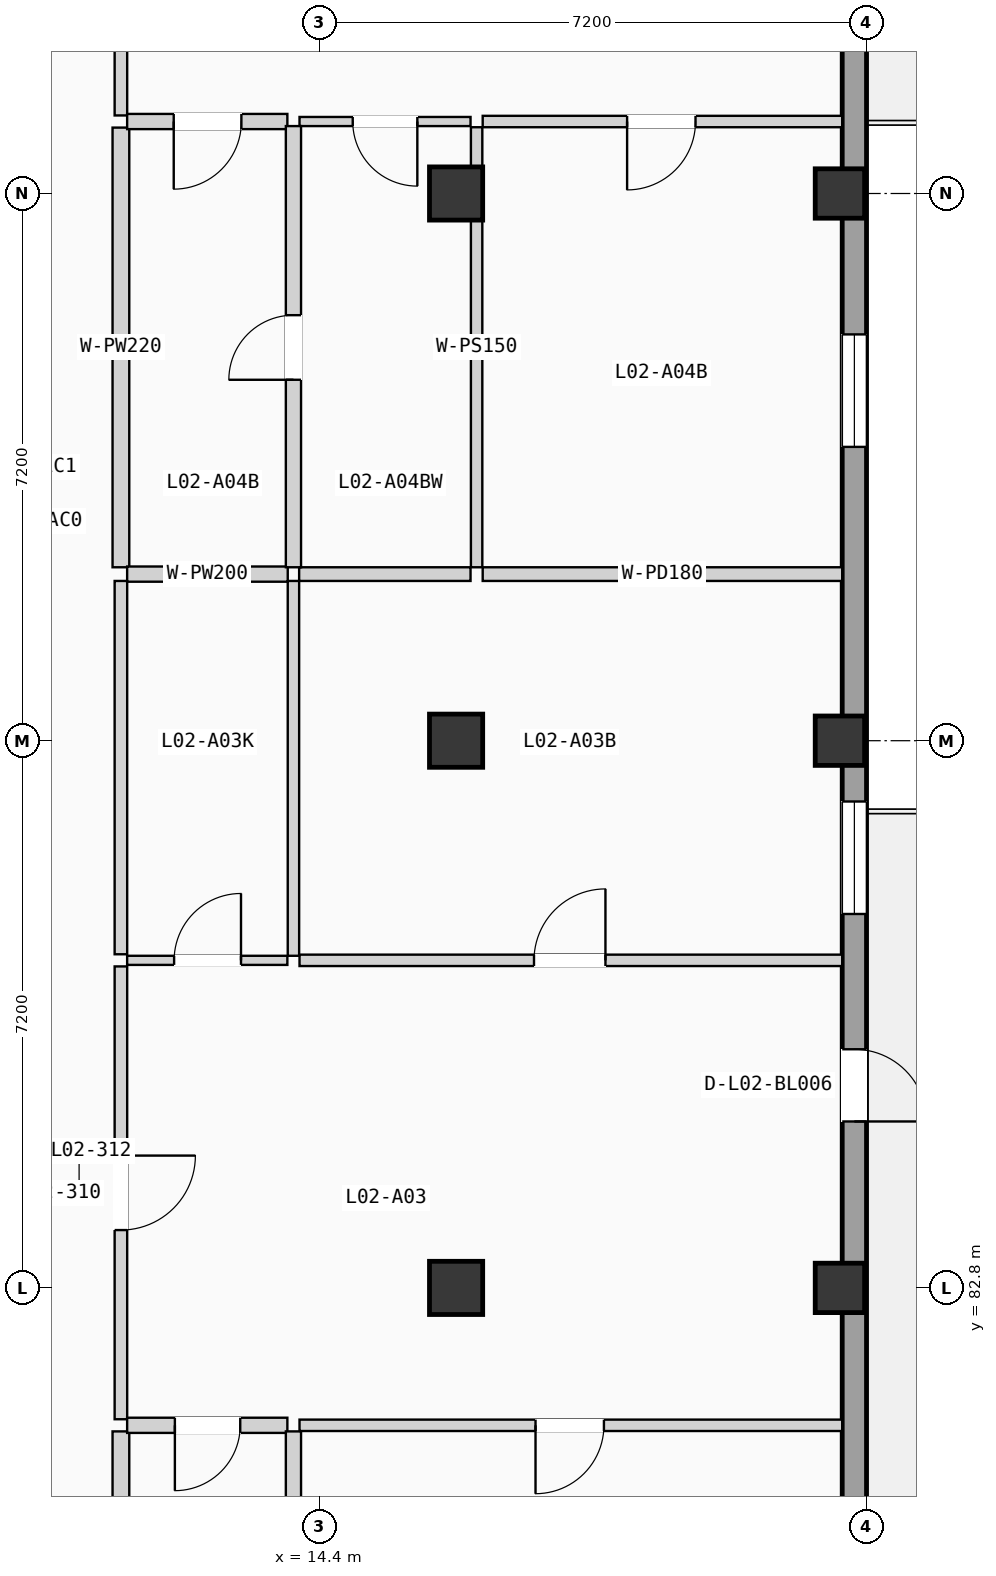
"""IFC4 building model, lengths in metres.
Left out: names, types, materials, properties, quantities, classifications, styles, units other than length and angle.
Written with IfcOpenShell. Run it as: python <this file> out.ifc"""

import sys

from ifc_helpers import new_model, si_unit, direction, frame, frame_2d, origin, origin_2d, place, context, subcontext, project, spatial, rectangle, extrude, element, fill, save


model = new_model("IFC4")
c1 = context("Model", 3, precision=1e-05, world=origin(), true_north=direction((0.0, 1.0)))
c2 = subcontext(c1, "Body", "Model", "MODEL_VIEW")
j1 = project(units=[si_unit("LENGTHUNIT", "METRE"), si_unit("PLANEANGLEUNIT", "RADIAN")], contexts=[c1])
p1 = place(None, origin())
s1 = spatial("IfcSite", under=j1, at=p1, CompositionType="ELEMENT")
p2 = place(p1, origin())
s2 = spatial("IfcBuilding", under=s1, at=p2, CompositionType="ELEMENT")
p3 = place(p2, frame((0.0, 0.0, 8.575)))
s3 = spatial("IfcBuildingStorey", under=s2, at=p3, CompositionType="ELEMENT", Elevation=8.575)
for number, where, z_axis, x_axis in (
    (1, (16.2, 82.8, 0.0), (0.0, 0.0, 1.0), (1.0, 0.0, 0.0)),
    (2, (16.2, 90.0, 0.0), (0.0, 0.0, 1.0), (1.0, 0.0, 0.0)),
    (3, (16.2, 97.2, 0.0), (0.0, 0.0, 1.0), (1.0, 0.0, 0.0)),
):
    element("IfcColumn", number, at=place(p3, frame(where, z_axis=z_axis, x_axis=x_axis)), inside=s3, PredefinedType="COLUMN", context=c2, shape_type="SweptSolid", body=[
        extrude(rectangle(XDim=0.7, YDim=0.7, at=origin_2d()), origin(), (0.0, 0.0, 1.0), 3.5),
    ])
for number, where, z_axis, x_axis in (
    (4, (21.25, 82.8, 0.0), (0.0, 0.0, 1.0), (1.0, 0.0, 0.0)),
    (5, (21.25, 90.0, 0.0), (0.0, 0.0, 1.0), (1.0, 0.0, 0.0)),
    (6, (21.25, 97.2, 0.0), (0.0, 0.0, 1.0), (1.0, 0.0, 0.0)),
):
    element("IfcColumn", number, at=place(p3, frame(where, z_axis=z_axis, x_axis=x_axis)), inside=s3, PredefinedType="COLUMN", context=c2, shape_type="SweptSolid", body=[
        extrude(rectangle(XDim=0.65, YDim=0.65, at=origin_2d()), origin(), (0.0, 0.0, 1.0), 3.5),
    ])
p4 = place(p3, frame((21.44, 68.72, 0.0), z_axis=(0.0, 0.0, 1.0), x_axis=(0.0, 1.0, 0.0)))
e7 = element("IfcWall", 7, at=p4, inside=s3, PredefinedType="SOLIDWALL", context=c2, shape_type="SweptSolid", body=[
    extrude(rectangle(XDim=49.76, YDim=0.32, at=frame_2d((24.88, 0.0))), origin(), (0.0, 0.0, 1.0), 3.24),
])
p5 = place(p4, frame((16.27, 0.0, 0.0)))
e8 = element("IfcOpeningElement", 8, at=p5, cuts=e7, PredefinedType="OPENING", context=c2, shape_type="SweptSolid", body=[
    extrude(rectangle(XDim=0.95, YDim=2.15, at=frame_2d((0.475, 1.075))), frame((0.0, 0.17, 0.0), z_axis=(0.0, -1.0, 0.0), x_axis=(1.0, 0.0, 0.0)), (0.0, 0.0, 1.0), 0.34),
])
p6 = place(p4, frame((8.996, 0.0, 0.9)))
e9 = element("IfcOpeningElement", 9, at=p6, cuts=e7, PredefinedType="OPENING", context=c2, shape_type="SweptSolid", body=[
    extrude(rectangle(XDim=1.48, YDim=1.2, at=frame_2d((0.74, 0.6))), frame((0.0, 0.17, 0.0), z_axis=(0.0, -1.0, 0.0), x_axis=(1.0, 0.0, 0.0)), (0.0, 0.0, 1.0), 0.34),
])
p7 = place(p4, frame((19.0, 0.0, 0.9)))
e10 = element("IfcOpeningElement", 10, at=p7, cuts=e7, PredefinedType="OPENING", context=c2, shape_type="SweptSolid", body=[
    extrude(rectangle(XDim=1.48, YDim=1.35, at=frame_2d((0.74, 0.675))), frame((0.0, 0.17, 0.0), z_axis=(0.0, -1.0, 0.0), x_axis=(1.0, 0.0, 0.0)), (0.0, 0.0, 1.0), 0.34),
])
p8 = place(p4, frame((32.365, 0.0, 0.0)))
e11 = element("IfcOpeningElement", 11, at=p8, cuts=e7, PredefinedType="OPENING", context=c2, shape_type="SweptSolid", body=[
    extrude(rectangle(XDim=1.08, YDim=2.18, at=frame_2d((0.54, 1.09))), frame((0.0, 0.17, 0.0), z_axis=(0.0, -1.0, 0.0), x_axis=(1.0, 0.0, 0.0)), (0.0, 0.0, 1.0), 0.34),
])
p9 = place(p4, frame((25.146, 0.0, 0.9)))
e12 = element("IfcOpeningElement", 12, at=p9, cuts=e7, PredefinedType="OPENING", context=c2, shape_type="SweptSolid", body=[
    extrude(rectangle(XDim=1.48, YDim=1.5, at=frame_2d((0.74, 0.75))), frame((0.0, 0.17, 0.0), z_axis=(0.0, -1.0, 0.0), x_axis=(1.0, 0.0, 0.0)), (0.0, 0.0, 1.0), 0.34),
])
p10 = place(p4, frame((38.848, 0.0, 0.9)))
e13 = element("IfcOpeningElement", 13, at=p10, cuts=e7, PredefinedType="OPENING", context=c2, shape_type="SweptSolid", body=[
    extrude(rectangle(XDim=1.48, YDim=1.65, at=frame_2d((0.74, 0.825))), frame((0.0, 0.17, 0.0), z_axis=(0.0, -1.0, 0.0), x_axis=(1.0, 0.0, 0.0)), (0.0, 0.0, 1.0), 0.34),
])
p11 = place(p3, frame((11.79, 81.072, 0.0), z_axis=(0.0, 0.0, 1.0), x_axis=(0.0, 1.0, 0.0)))
e14 = element("IfcWall", 14, at=p11, inside=s3, PredefinedType="PARTITIONING", context=c2, shape_type="SweptSolid", body=[
    extrude(rectangle(XDim=5.958, YDim=0.165, at=frame_2d((2.979, 0.0))), origin(), (0.0, 0.0, 1.0), 3.22),
])
p12 = place(p11, frame((2.489, 0.0, 0.0)))
e15 = element("IfcOpeningElement", 15, at=p12, cuts=e14, PredefinedType="OPENING", context=c2, shape_type="SweptSolid", body=[
    extrude(rectangle(XDim=0.98, YDim=2.08, at=frame_2d((0.49, 1.04))), frame((0.0, 0.093, 0.0), z_axis=(0.0, -1.0, 0.0), x_axis=(1.0, 0.0, 0.0)), (0.0, 0.0, 1.0), 0.185),
])
p13 = place(p3, frame((11.79, 75.975, 0.0), z_axis=(0.0, 0.0, 1.0), x_axis=(0.0, 1.0, 0.0)))
e16 = element("IfcWall", 16, at=p13, inside=s3, PredefinedType="PLUMBINGWALL", context=c2, shape_type="SweptSolid", body=[
    extrude(rectangle(XDim=4.937, YDim=0.22, at=frame_2d((2.469, 0.0))), origin(), (0.0, 0.0, 1.0), 3.22),
])
p14 = place(p3, frame((11.79, 87.19, 0.0), z_axis=(0.0, 0.0, 1.0), x_axis=(0.0, 1.0, 0.0)))
e17 = element("IfcWall", 17, at=p14, inside=s3, PredefinedType="PARTITIONING", context=c2, shape_type="SweptSolid", body=[
    extrude(rectangle(XDim=4.912, YDim=0.165, at=frame_2d((2.456, 0.0))), origin(), (0.0, 0.0, 1.0), 3.22),
])
p15 = place(p3, frame((11.79, 98.227, 0.0), z_axis=(0.0, 0.0, 1.0), x_axis=(0.0, 1.0, 0.0)))
e18 = element("IfcWall", 18, at=p15, inside=s3, PredefinedType="PARTITIONING", context=c2, shape_type="SweptSolid", body=[
    extrude(rectangle(XDim=7.028, YDim=0.165, at=frame_2d((3.514, 0.0))), origin(), (0.0, 0.0, 1.0), 3.22),
])
p16 = place(p15, frame((3.024, 0.0, 0.0)))
e19 = element("IfcOpeningElement", 19, at=p16, cuts=e18, PredefinedType="OPENING", context=c2, shape_type="SweptSolid", body=[
    extrude(rectangle(XDim=0.98, YDim=2.08, at=frame_2d((0.49, 1.04))), frame((0.0, 0.093, 0.0), z_axis=(0.0, -1.0, 0.0), x_axis=(1.0, 0.0, 0.0)), (0.0, 0.0, 1.0), 0.185),
])
p17 = place(p3, frame((11.79, 92.282, 0.0), z_axis=(0.0, 0.0, 1.0), x_axis=(0.0, 1.0, 0.0)))
e20 = element("IfcWall", 20, at=p17, inside=s3, PredefinedType="PLUMBINGWALL", context=c2, shape_type="SweptSolid", body=[
    extrude(rectangle(XDim=5.785, YDim=0.22, at=frame_2d((2.893, 0.0))), origin(), (0.0, 0.0, 1.0), 3.22),
])
p18 = place(p3, frame((11.872, 80.992, 0.0), z_axis=(0.0, 0.0, 1.0), x_axis=(1.0, 0.0, 0.0)))
e21 = element("IfcWall", 21, at=p18, inside=s3, PredefinedType="PLUMBINGWALL", context=c2, shape_type="SweptSolid", body=[
    extrude(rectangle(XDim=2.108, YDim=0.2, at=frame_2d((1.054, 0.0))), origin(), (0.0, 0.0, 1.0), 3.22),
])
p19 = place(p18, frame((0.628, 0.0, 0.0)))
e22 = element("IfcOpeningElement", 22, at=p19, cuts=e21, PredefinedType="OPENING", context=c2, shape_type="SweptSolid", body=[
    extrude(rectangle(XDim=0.86, YDim=2.0, at=frame_2d((0.43, 1.0))), frame((0.0, 0.11, 0.0), z_axis=(0.0, -1.0, 0.0), x_axis=(1.0, 0.0, 0.0)), (0.0, 0.0, 1.0), 0.22),
])
p20 = place(p3, frame((11.872, 87.11, 0.0), z_axis=(0.0, 0.0, 1.0), x_axis=(1.0, 0.0, 0.0)))
e23 = element("IfcWall", 23, at=p20, inside=s3, PredefinedType="PARTITIONING", context=c2, shape_type="SweptSolid", body=[
    extrude(rectangle(XDim=2.108, YDim=0.12, at=frame_2d((1.054, 0.0))), origin(), (0.0, 0.0, 1.0), 3.22),
])
p21 = place(p20, frame((0.618, 0.0, 0.0)))
e24 = element("IfcOpeningElement", 24, at=p21, cuts=e23, PredefinedType="OPENING", context=c2, shape_type="SweptSolid", body=[
    extrude(rectangle(XDim=0.88, YDim=2.02, at=frame_2d((0.44, 1.01))), frame((0.0, 0.07, 0.0), z_axis=(0.0, -1.0, 0.0), x_axis=(1.0, 0.0, 0.0)), (0.0, 0.0, 1.0), 0.14),
])
p22 = place(p3, frame((14.14, 80.992, 0.0), z_axis=(0.0, 0.0, 1.0), x_axis=(1.0, 0.0, 0.0)))
e25 = element("IfcWall", 25, at=p22, inside=s3, PredefinedType="PARTITIONING", context=c2, shape_type="SweptSolid", body=[
    extrude(rectangle(XDim=7.14, YDim=0.15, at=frame_2d((3.57, 0.0))), origin(), (0.0, 0.0, 1.0), 3.22),
])
p23 = place(p22, frame((3.105, 0.0, 0.0)))
e26 = element("IfcOpeningElement", 26, at=p23, cuts=e25, PredefinedType="OPENING", context=c2, shape_type="SweptSolid", body=[
    extrude(rectangle(XDim=0.9, YDim=2.04, at=frame_2d((0.45, 1.02))), frame((0.0, 0.085, 0.0), z_axis=(0.0, -1.0, 0.0), x_axis=(1.0, 0.0, 0.0)), (0.0, 0.0, 1.0), 0.17),
])
p24 = place(p3, frame((14.14, 87.11, 0.0), z_axis=(0.0, 0.0, 1.0), x_axis=(1.0, 0.0, 0.0)))
e27 = element("IfcWall", 27, at=p24, inside=s3, PredefinedType="PARTITIONING", context=c2, shape_type="SweptSolid", body=[
    extrude(rectangle(XDim=7.14, YDim=0.15, at=frame_2d((3.57, 0.0))), origin(), (0.0, 0.0, 1.0), 3.22),
])
p25 = place(p24, frame((3.085, 0.0, 0.0)))
e28 = element("IfcOpeningElement", 28, at=p25, cuts=e27, PredefinedType="OPENING", context=c2, shape_type="SweptSolid", body=[
    extrude(rectangle(XDim=0.94, YDim=2.06, at=frame_2d((0.47, 1.03))), frame((0.0, 0.085, 0.0), z_axis=(0.0, -1.0, 0.0), x_axis=(1.0, 0.0, 0.0)), (0.0, 0.0, 1.0), 0.17),
])
p26 = place(p3, frame((14.06, 75.975, 0.0), z_axis=(0.0, 0.0, 1.0), x_axis=(0.0, 1.0, 0.0)))
e29 = element("IfcWall", 29, at=p26, inside=s3, PredefinedType="PLUMBINGWALL", context=c2, shape_type="SweptSolid", body=[
    extrude(rectangle(XDim=4.937, YDim=0.2, at=frame_2d((2.469, 0.0))), origin(), (0.0, 0.0, 1.0), 3.22),
])
p27 = place(p3, frame((14.06, 87.17, 0.0), z_axis=(0.0, 0.0, 1.0), x_axis=(0.0, 1.0, 0.0)))
e30 = element("IfcWall", 30, at=p27, inside=s3, PredefinedType="PARTITIONING", context=c2, shape_type="SweptSolid", body=[
    extrude(rectangle(XDim=4.932, YDim=0.15, at=frame_2d((2.466, 0.0))), origin(), (0.0, 0.0, 1.0), 3.22),
])
p28 = place(p3, frame((11.872, 92.192, 0.0), z_axis=(0.0, 0.0, 1.0), x_axis=(1.0, 0.0, 0.0)))
e31 = element("IfcWall", 31, at=p28, inside=s3, PredefinedType="PLUMBINGWALL", context=c2, shape_type="SweptSolid", body=[
    extrude(rectangle(XDim=2.113, YDim=0.2, at=frame_2d((1.057, 0.0))), origin(), (0.0, 0.0, 1.0), 3.22),
])
p29 = place(p3, frame((16.55, 92.192, 0.0), z_axis=(0.0, 0.0, 1.0), x_axis=(1.0, 0.0, 0.0)))
e32 = element("IfcWall", 32, at=p29, inside=s3, PredefinedType="PARTITIONING", context=c2, shape_type="SweptSolid", body=[
    extrude(rectangle(XDim=4.73, YDim=0.18, at=frame_2d((2.365, 0.0))), origin(), (0.0, 0.0, 1.0), 3.22),
])
p30 = place(p3, frame((14.135, 92.192, 0.0), z_axis=(0.0, 0.0, 1.0), x_axis=(1.0, 0.0, 0.0)))
e33 = element("IfcWall", 33, at=p30, inside=s3, PredefinedType="PARTITIONING", context=c2, shape_type="SweptSolid", body=[
    extrude(rectangle(XDim=2.255, YDim=0.18, at=frame_2d((1.127, 0.0))), origin(), (0.0, 0.0, 1.0), 3.22),
])
p31 = place(p3, frame((11.872, 98.147, 0.0), z_axis=(0.0, 0.0, 1.0), x_axis=(1.0, 0.0, 0.0)))
e34 = element("IfcWall", 34, at=p31, inside=s3, PredefinedType="PLUMBINGWALL", context=c2, shape_type="SweptSolid", body=[
    extrude(rectangle(XDim=2.108, YDim=0.2, at=frame_2d((1.054, 0.0))), origin(), (0.0, 0.0, 1.0), 3.22),
])
p32 = place(p31, frame((0.613, 0.0, 0.0)))
e35 = element("IfcOpeningElement", 35, at=p32, cuts=e34, PredefinedType="OPENING", context=c2, shape_type="SweptSolid", body=[
    extrude(rectangle(XDim=0.89, YDim=2.03, at=frame_2d((0.445, 1.015))), frame((0.0, 0.11, 0.0), z_axis=(0.0, -1.0, 0.0), x_axis=(1.0, 0.0, 0.0)), (0.0, 0.0, 1.0), 0.22),
])
p33 = place(p3, frame((16.55, 98.147, 0.0), z_axis=(0.0, 0.0, 1.0), x_axis=(1.0, 0.0, 0.0)))
e36 = element("IfcWall", 36, at=p33, inside=s3, PredefinedType="PARTITIONING", context=c2, shape_type="SweptSolid", body=[
    extrude(rectangle(XDim=4.73, YDim=0.15, at=frame_2d((2.365, 0.0))), origin(), (0.0, 0.0, 1.0), 3.22),
])
p34 = place(p33, frame((1.9, 0.0, 0.0)))
e37 = element("IfcOpeningElement", 37, at=p34, cuts=e36, PredefinedType="OPENING", context=c2, shape_type="SweptSolid", body=[
    extrude(rectangle(XDim=0.9, YDim=2.04, at=frame_2d((0.45, 1.02))), frame((0.0, 0.085, 0.0), z_axis=(0.0, -1.0, 0.0), x_axis=(1.0, 0.0, 0.0)), (0.0, 0.0, 1.0), 0.17),
])
p35 = place(p3, frame((14.14, 98.147, 0.0), z_axis=(0.0, 0.0, 1.0), x_axis=(1.0, 0.0, 0.0)))
e38 = element("IfcWall", 38, at=p35, inside=s3, PredefinedType="PARTITIONING", context=c2, shape_type="SweptSolid", body=[
    extrude(rectangle(XDim=2.25, YDim=0.12, at=frame_2d((1.125, 0.0))), origin(), (0.0, 0.0, 1.0), 3.22),
])
p36 = place(p35, frame((0.7, 0.0, 0.0)))
e39 = element("IfcOpeningElement", 39, at=p36, cuts=e38, PredefinedType="OPENING", context=c2, shape_type="SweptSolid", body=[
    extrude(rectangle(XDim=0.85, YDim=2.01, at=frame_2d((0.425, 1.005))), frame((0.0, 0.07, 0.0), z_axis=(0.0, -1.0, 0.0), x_axis=(1.0, 0.0, 0.0)), (0.0, 0.0, 1.0), 0.14),
])
p37 = place(p3, frame((14.06, 92.282, 0.0), z_axis=(0.0, 0.0, 1.0), x_axis=(0.0, 1.0, 0.0)))
e40 = element("IfcWall", 40, at=p37, inside=s3, PredefinedType="PLUMBINGWALL", context=c2, shape_type="SweptSolid", body=[
    extrude(rectangle(XDim=5.805, YDim=0.2, at=frame_2d((2.902, 0.0))), origin(), (0.0, 0.0, 1.0), 3.22),
])
p38 = place(p37, frame((2.467, 0.0, 0.0)))
e41 = element("IfcOpeningElement", 41, at=p38, cuts=e40, PredefinedType="OPENING", context=c2, shape_type="SweptSolid", body=[
    extrude(rectangle(XDim=0.85, YDim=2.01, at=frame_2d((0.425, 1.005))), frame((0.0, 0.11, 0.0), z_axis=(0.0, -1.0, 0.0), x_axis=(1.0, 0.0, 0.0)), (0.0, 0.0, 1.0), 0.22),
])
p39 = place(p3, frame((16.47, 92.282, 0.0), z_axis=(0.0, 0.0, 1.0), x_axis=(0.0, 1.0, 0.0)))
e42 = element("IfcWall", 42, at=p39, inside=s3, PredefinedType="PARTITIONING", context=c2, shape_type="SweptSolid", body=[
    extrude(rectangle(XDim=5.79, YDim=0.15, at=frame_2d((2.895, 0.0))), origin(), (0.0, 0.0, 1.0), 3.22),
])
p40 = place(p5, frame((0.95, 0.0, 0.0), z_axis=(0.0, 0.0, 1.0), x_axis=(-1.0, 0.0, 0.0)))
e43 = element("IfcDoor", 43, at=p40, inside=s3, OperationType="SINGLE_SWING_LEFT", PredefinedType="DOOR", context=c2, shape_type="SweptSolid", body=[
    extrude(rectangle(XDim=0.95, YDim=2.15, at=frame_2d((0.475, 1.075))), frame((0.0, 0.025, 0.0), z_axis=(0.0, -1.0, 0.0), x_axis=(1.0, 0.0, 0.0)), (0.0, 0.0, 1.0), 0.05),
])
fill(e8, e43)
p41 = place(p7, origin())
e44 = element("IfcWindow", 44, at=p41, inside=s3, PartitioningType="SINGLE_PANEL", PredefinedType="WINDOW", context=c2, shape_type="SweptSolid", body=[
    extrude(rectangle(XDim=1.48, YDim=1.35, at=frame_2d((0.74, 0.675))), frame((0.0, 0.03, 0.0), z_axis=(0.0, -1.0, 0.0), x_axis=(1.0, 0.0, 0.0)), (0.0, 0.0, 1.0), 0.06),
])
fill(e10, e44)
p42 = place(p9, origin())
e45 = element("IfcWindow", 45, at=p42, inside=s3, PartitioningType="SINGLE_PANEL", PredefinedType="WINDOW", context=c2, shape_type="SweptSolid", body=[
    extrude(rectangle(XDim=1.48, YDim=1.5, at=frame_2d((0.74, 0.75))), frame((0.0, 0.03, 0.0), z_axis=(0.0, -1.0, 0.0), x_axis=(1.0, 0.0, 0.0)), (0.0, 0.0, 1.0), 0.06),
])
fill(e12, e45)
p43 = place(p12, frame((0.98, 0.0, 0.0), z_axis=(0.0, 0.0, 1.0), x_axis=(-1.0, 0.0, 0.0)))
e46 = element("IfcDoor", 46, at=p43, inside=s3, OperationType="SINGLE_SWING_RIGHT", PredefinedType="DOOR", context=c2, shape_type="SweptSolid", body=[
    extrude(rectangle(XDim=0.98, YDim=2.08, at=frame_2d((0.49, 1.04))), frame((0.0, 0.025, 0.0), z_axis=(0.0, -1.0, 0.0), x_axis=(1.0, 0.0, 0.0)), (0.0, 0.0, 1.0), 0.05),
])
fill(e15, e46)
p44 = place(p19, frame((0.86, 0.0, 0.0), z_axis=(0.0, 0.0, 1.0), x_axis=(-1.0, 0.0, 0.0)))
e47 = element("IfcDoor", 47, at=p44, inside=s3, OperationType="SINGLE_SWING_LEFT", PredefinedType="DOOR", context=c2, shape_type="SweptSolid", body=[
    extrude(rectangle(XDim=0.86, YDim=2.0, at=frame_2d((0.43, 1.0))), frame((0.0, 0.025, 0.0), z_axis=(0.0, -1.0, 0.0), x_axis=(1.0, 0.0, 0.0)), (0.0, 0.0, 1.0), 0.05),
])
fill(e22, e47)
p45 = place(p21, origin())
e48 = element("IfcDoor", 48, at=p45, inside=s3, OperationType="SINGLE_SWING_RIGHT", PredefinedType="DOOR", context=c2, shape_type="SweptSolid", body=[
    extrude(rectangle(XDim=0.88, YDim=2.02, at=frame_2d((0.44, 1.01))), frame((0.0, 0.025, 0.0), z_axis=(0.0, -1.0, 0.0), x_axis=(1.0, 0.0, 0.0)), (0.0, 0.0, 1.0), 0.05),
])
fill(e24, e48)
p46 = place(p23, frame((0.9, 0.0, 0.0), z_axis=(0.0, 0.0, 1.0), x_axis=(-1.0, 0.0, 0.0)))
e49 = element("IfcDoor", 49, at=p46, inside=s3, OperationType="SINGLE_SWING_LEFT", PredefinedType="DOOR", context=c2, shape_type="SweptSolid", body=[
    extrude(rectangle(XDim=0.9, YDim=2.04, at=frame_2d((0.45, 1.02))), frame((0.0, 0.025, 0.0), z_axis=(0.0, -1.0, 0.0), x_axis=(1.0, 0.0, 0.0)), (0.0, 0.0, 1.0), 0.05),
])
fill(e26, e49)
p47 = place(p25, origin())
e50 = element("IfcDoor", 50, at=p47, inside=s3, OperationType="SINGLE_SWING_RIGHT", PredefinedType="DOOR", context=c2, shape_type="SweptSolid", body=[
    extrude(rectangle(XDim=0.94, YDim=2.06, at=frame_2d((0.47, 1.03))), frame((0.0, 0.025, 0.0), z_axis=(0.0, -1.0, 0.0), x_axis=(1.0, 0.0, 0.0)), (0.0, 0.0, 1.0), 0.05),
])
fill(e28, e50)
p48 = place(p32, frame((0.89, 0.0, 0.0), z_axis=(0.0, 0.0, 1.0), x_axis=(-1.0, 0.0, 0.0)))
e51 = element("IfcDoor", 51, at=p48, inside=s3, OperationType="SINGLE_SWING_LEFT", PredefinedType="DOOR", context=c2, shape_type="SweptSolid", body=[
    extrude(rectangle(XDim=0.89, YDim=2.03, at=frame_2d((0.445, 1.015))), frame((0.0, 0.025, 0.0), z_axis=(0.0, -1.0, 0.0), x_axis=(1.0, 0.0, 0.0)), (0.0, 0.0, 1.0), 0.05),
])
fill(e35, e51)
p49 = place(p34, frame((0.9, 0.0, 0.0), z_axis=(0.0, 0.0, 1.0), x_axis=(-1.0, 0.0, 0.0)))
e52 = element("IfcDoor", 52, at=p49, inside=s3, OperationType="SINGLE_SWING_LEFT", PredefinedType="DOOR", context=c2, shape_type="SweptSolid", body=[
    extrude(rectangle(XDim=0.9, YDim=2.04, at=frame_2d((0.45, 1.02))), frame((0.0, 0.025, 0.0), z_axis=(0.0, -1.0, 0.0), x_axis=(1.0, 0.0, 0.0)), (0.0, 0.0, 1.0), 0.05),
])
fill(e37, e52)
p50 = place(p36, frame((0.85, 0.0, 0.0), z_axis=(0.0, 0.0, 1.0), x_axis=(-1.0, 0.0, 0.0)))
e53 = element("IfcDoor", 53, at=p50, inside=s3, OperationType="SINGLE_SWING_RIGHT", PredefinedType="DOOR", context=c2, shape_type="SweptSolid", body=[
    extrude(rectangle(XDim=0.85, YDim=2.01, at=frame_2d((0.425, 1.005))), frame((0.0, 0.025, 0.0), z_axis=(0.0, -1.0, 0.0), x_axis=(1.0, 0.0, 0.0)), (0.0, 0.0, 1.0), 0.05),
])
fill(e39, e53)
p51 = place(p38, origin())
e54 = element("IfcDoor", 54, at=p51, inside=s3, OperationType="SINGLE_SWING_LEFT", PredefinedType="DOOR", context=c2, shape_type="SweptSolid", body=[
    extrude(rectangle(XDim=0.85, YDim=2.01, at=frame_2d((0.425, 1.005))), frame((0.0, 0.025, 0.0), z_axis=(0.0, -1.0, 0.0), x_axis=(1.0, 0.0, 0.0)), (0.0, 0.0, 1.0), 0.05),
])
fill(e41, e54)
save(model, sys.argv[1])
